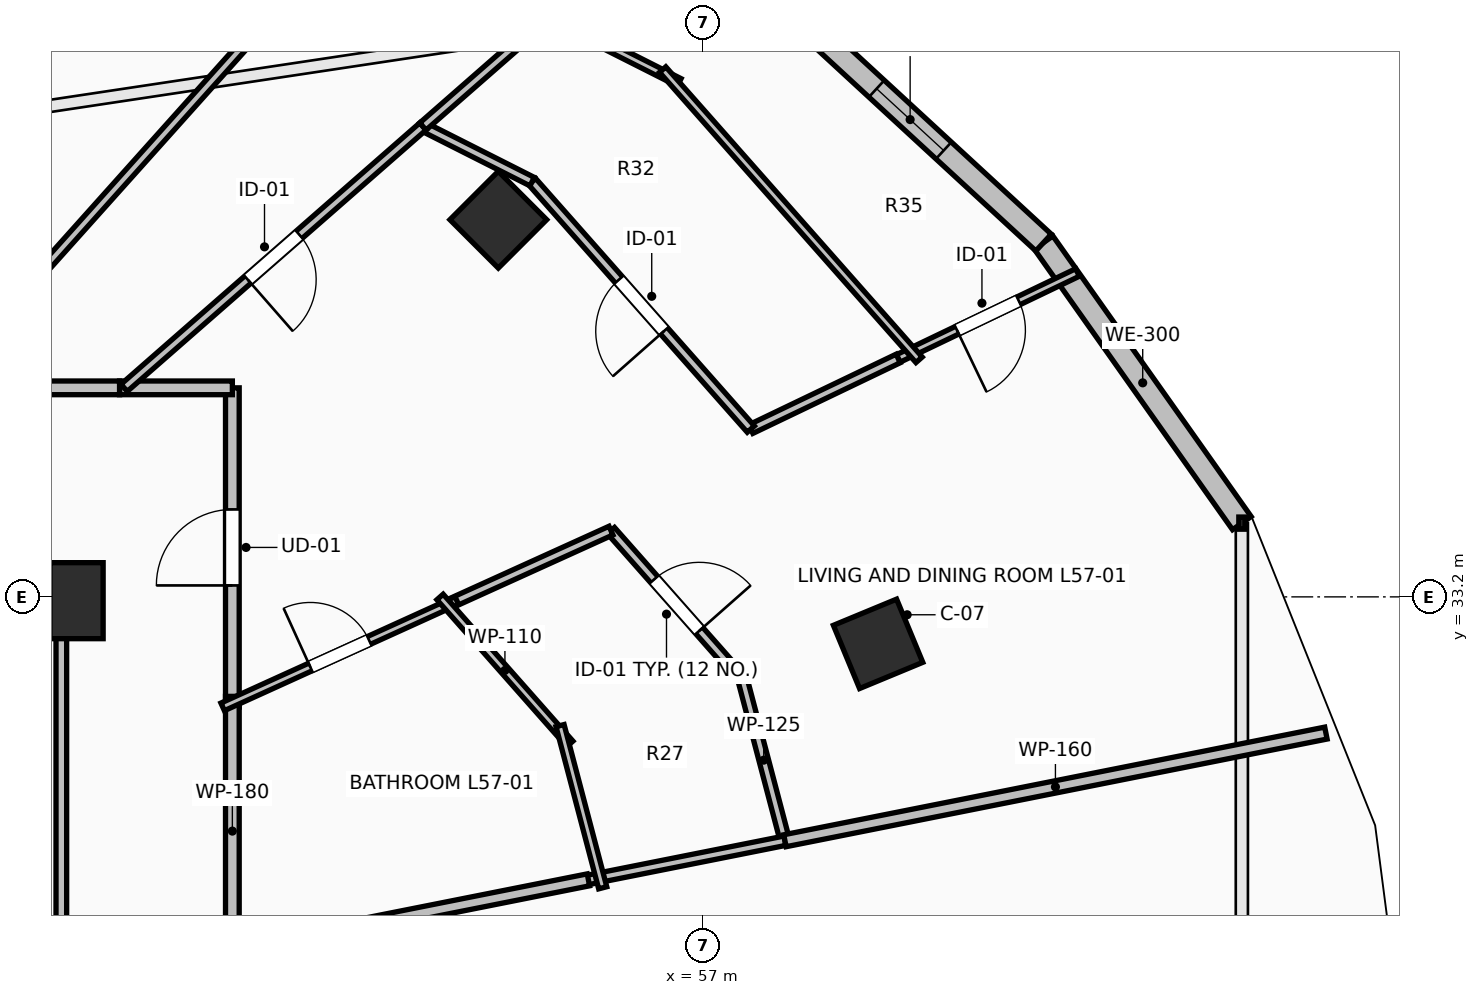
"""IFC4 building model, lengths in metres.
Left out: names, types, materials, properties, quantities, classifications, styles, units other than length and angle.
Written with IfcOpenShell. Run it as: python <this file> out.ifc"""

import sys

from ifc_helpers import new_model, si_unit, direction, frame, frame_2d, origin, origin_2d, place, context, subcontext, project, spatial, rectangle, extrude, element, fill, save


model = new_model("IFC4")
c1 = context("Model", 3, precision=1e-05, world=origin(), true_north=direction((0.0, 1.0)))
c2 = subcontext(c1, "Body", "Model", "MODEL_VIEW")
j1 = project(units=[si_unit("LENGTHUNIT", "METRE"), si_unit("PLANEANGLEUNIT", "RADIAN")], contexts=[c1])
p1 = place(None, origin())
s1 = spatial("IfcSite", under=j1, at=p1, CompositionType="ELEMENT")
p2 = place(p1, origin())
s2 = spatial("IfcBuilding", under=s1, at=p2, CompositionType="ELEMENT")
p3 = place(p2, frame((0.0, 0.0, 210.75)))
s3 = spatial("IfcBuildingStorey", under=s2, at=p3, CompositionType="ELEMENT", Elevation=210.75)
for number, where, z_axis, x_axis in (
    (1, (59.295, 32.582, 0.0), (0.0, 0.0, 1.0), (0.924, 0.383, 0.0)),
    (2, (54.299, 38.162, 0.0), (0.0, 0.0, 1.0), (0.707, 0.707, 0.0)),
):
    element("IfcColumn", number, at=place(p3, frame(where, z_axis=z_axis, x_axis=x_axis)), inside=s3, PredefinedType="COLUMN", context=c2, shape_type="SweptSolid", body=[
        extrude(rectangle(XDim=0.9, YDim=0.9, at=origin_2d()), origin(), (0.0, 0.0, 1.0), 3.55),
    ])
p4 = place(p3, frame((48.75, 33.15, 0.0), z_axis=(0.0, 0.0, 1.0), x_axis=(1.0, 0.0, 0.0)))
e3 = element("IfcColumn", 3, at=p4, inside=s3, PredefinedType="PILASTER", context=c2, shape_type="SweptSolid", body=[
    extrude(rectangle(XDim=0.7, YDim=1.0, at=origin_2d()), origin(), (0.0, 0.0, 1.0), 3.55),
])
p5 = place(p3, frame((64.081, 34.17, 0.0), z_axis=(0.0, 0.0, 1.0), x_axis=(-0.577168747264, 0.81662490605, 0.0)))
e4 = element("IfcWall", 4, at=p5, inside=s3, PredefinedType="STANDARD", context=c2, shape_type="SweptSolid", body=[
    extrude(rectangle(XDim=4.52, YDim=0.3, at=frame_2d((2.26, 0.0))), origin(), (0.0, 0.0, 1.0), 3.29),
])
p6 = place(p3, frame((61.472, 37.861, 0.0), z_axis=(0.0, 0.0, 1.0), x_axis=(-0.735359993374, 0.677676678177, 0.0)))
e5 = element("IfcWall", 5, at=p6, inside=s3, PredefinedType="STANDARD", context=c2, shape_type="SweptSolid", body=[
    extrude(rectangle(XDim=4.774, YDim=0.3, at=frame_2d((2.387, 0.0))), origin(), (0.0, 0.0, 1.0), 3.29),
])
p7 = place(p6, frame((1.787, 0.0, 0.85)))
e6 = element("IfcOpeningElement", 6, at=p7, cuts=e5, PredefinedType="OPENING", context=c2, shape_type="SweptSolid", body=[
    extrude(rectangle(XDim=1.2, YDim=2.1, at=frame_2d((0.6, 1.05))), frame((0.0, 0.165, 0.0), z_axis=(0.0, -1.0, 0.0), x_axis=(1.0, 0.0, 0.0)), (0.0, 0.0, 1.0), 0.33),
])
p8 = place(p3, frame((50.8, 31.751, 0.0), z_axis=(0.0, 0.0, 1.0), x_axis=(0.0, 1.0, 0.0)))
e7 = element("IfcWall", 7, at=p8, inside=s3, PredefinedType="PARTITIONING", context=c2, shape_type="SweptSolid", body=[
    extrude(rectangle(XDim=4.199, YDim=0.18, at=frame_2d((2.1, 0.0))), origin(), (0.0, 0.0, 1.0), 2.482),
])
p9 = place(p8, frame((1.6, 0.0, 0.0)))
e8 = element("IfcOpeningElement", 8, at=p9, cuts=e7, PredefinedType="OPENING", context=c2, shape_type="SweptSolid", body=[
    extrude(rectangle(XDim=1.0, YDim=2.15, at=frame_2d((0.5, 1.075))), frame((0.0, 0.105, 0.0), z_axis=(0.0, -1.0, 0.0), x_axis=(1.0, 0.0, 0.0)), (0.0, 0.0, 1.0), 0.21),
])
p10 = place(p3, frame((50.8, 35.95, 0.0), z_axis=(0.0, 0.0, 1.0), x_axis=(-1.0, 0.0, 0.0)))
e9 = element("IfcWall", 9, at=p10, inside=s3, PredefinedType="PARTITIONING", context=c2, shape_type="SweptSolid", body=[
    extrude(rectangle(XDim=1.484, YDim=0.18, at=frame_2d((0.742, 0.0))), origin(), (0.0, 0.0, 1.0), 3.29),
])
p11 = place(p3, frame((50.8, 28.346, 0.0), z_axis=(0.0, 0.0, 1.0), x_axis=(0.0, 1.0, 0.0)))
e10 = element("IfcWall", 10, at=p11, inside=s3, PredefinedType="PARTITIONING", context=c2, shape_type="SweptSolid", body=[
    extrude(rectangle(XDim=3.545, YDim=0.18, at=frame_2d((1.772, 0.0))), origin(), (0.0, 0.0, 1.0), 3.29),
])
p12 = place(p3, frame((49.316, 35.95, 0.0), z_axis=(0.0, 0.0, 1.0), x_axis=(-1.0, 0.0, 0.0)))
e11 = element("IfcWall", 11, at=p12, inside=s3, PredefinedType="PARTITIONING", context=c2, shape_type="SweptSolid", body=[
    extrude(rectangle(XDim=2.464, YDim=0.18, at=frame_2d((1.232, 0.0))), origin(), (0.0, 0.0, 1.0), 2.482),
])
p13 = place(p3, frame((55.781, 34.072, 0.0), z_axis=(0.0, 0.0, 1.0), x_axis=(0.661961245166, -0.749538064343, 0.0)))
e12 = element("IfcWall", 12, at=p13, inside=s3, PredefinedType="PARTITIONING", context=c2, shape_type="SweptSolid", body=[
    extrude(rectangle(XDim=2.615, YDim=0.125, at=frame_2d((1.308, 0.0))), origin(), (0.0, 0.0, 1.0), 2.482),
])
p14 = place(p13, frame((0.857, 0.0, 0.0)))
e13 = element("IfcOpeningElement", 13, at=p14, cuts=e12, PredefinedType="OPENING", context=c2, shape_type="SweptSolid", body=[
    extrude(rectangle(XDim=0.9, YDim=2.1, at=frame_2d((0.45, 1.05))), frame((0.0, 0.077, 0.0), z_axis=(0.0, -1.0, 0.0), x_axis=(1.0, 0.0, 0.0)), (0.0, 0.0, 1.0), 0.155),
])
p15 = place(p3, frame((57.512, 32.112, 0.0), z_axis=(0.0, 0.0, 1.0), x_axis=(0.254570039115, -0.967054339314, 0.0)))
e14 = element("IfcWall", 14, at=p15, inside=s3, PredefinedType="PARTITIONING", context=c2, shape_type="SweptSolid", body=[
    extrude(rectangle(XDim=2.192, YDim=0.125, at=frame_2d((1.096, 0.0))), origin(), (0.0, 0.0, 1.0), 3.29),
])
p16 = place(p3, frame((58.07, 29.992, 0.0), z_axis=(0.0, 0.0, 1.0), x_axis=(-0.98076287284, -0.19520293865, 0.0)))
e15 = element("IfcWall", 15, at=p16, inside=s3, PredefinedType="PARTITIONING", context=c2, shape_type="SweptSolid", body=[
    extrude(rectangle(XDim=2.777, YDim=0.125, at=frame_2d((1.388, 0.0))), origin(), (0.0, 0.0, 1.0), 2.936),
])
p17 = place(p3, frame((53.625, 33.094, 0.0), z_axis=(0.0, 0.0, 1.0), x_axis=(0.910680528551, 0.413111334773, 0.0)))
e16 = element("IfcWall", 16, at=p17, inside=s3, PredefinedType="PARTITIONING", context=c2, shape_type="SweptSolid", body=[
    extrude(rectangle(XDim=2.367, YDim=0.125, at=frame_2d((1.184, 0.0))), origin(), (0.0, 0.0, 1.0), 2.482),
])
p18 = place(p3, frame((50.673, 31.753, 0.0), z_axis=(0.0, 0.0, 1.0), x_axis=(0.910504846956, 0.413498396212, 0.0)))
e17 = element("IfcWall", 17, at=p18, inside=s3, PredefinedType="PARTITIONING", context=c2, shape_type="SweptSolid", body=[
    extrude(rectangle(XDim=3.383, YDim=0.11, at=frame_2d((1.691, 0.0))), origin(), (0.0, 0.0, 1.0), 2.482),
])
p19 = place(p18, frame((1.266, 0.0, 0.0)))
e18 = element("IfcOpeningElement", 18, at=p19, cuts=e17, PredefinedType="OPENING", context=c2, shape_type="SweptSolid", body=[
    extrude(rectangle(XDim=0.85, YDim=2.1, at=frame_2d((0.425, 1.05))), frame((0.0, 0.07, 0.0), z_axis=(0.0, -1.0, 0.0), x_axis=(1.0, 0.0, 0.0)), (0.0, 0.0, 1.0), 0.14),
])
p20 = place(p3, frame((61.919, 37.468, 0.0), z_axis=(0.0, 0.0, 1.0), x_axis=(-0.901731167672, -0.432297237151, 0.0)))
e19 = element("IfcWall", 19, at=p20, inside=s3, PredefinedType="PARTITIONING", context=c2, shape_type="SweptSolid", body=[
    extrude(rectangle(XDim=2.616, YDim=0.11, at=frame_2d((1.308, 0.0))), origin(), (0.0, 0.0, 1.0), 3.29),
])
p21 = place(p20, frame((0.858, 0.0, 0.0)))
e20 = element("IfcOpeningElement", 20, at=p21, cuts=e19, PredefinedType="OPENING", context=c2, shape_type="SweptSolid", body=[
    extrude(rectangle(XDim=0.9, YDim=2.1, at=frame_2d((0.45, 1.05))), frame((0.0, 0.07, 0.0), z_axis=(0.0, -1.0, 0.0), x_axis=(1.0, 0.0, 0.0)), (0.0, 0.0, 1.0), 0.14),
])
p22 = place(p3, frame((59.56, 36.336, 0.0), z_axis=(0.0, 0.0, 1.0), x_axis=(-0.901730274491, -0.432299100238, 0.0)))
e21 = element("IfcWall", 21, at=p22, inside=s3, PredefinedType="PARTITIONING", context=c2, shape_type="SweptSolid", body=[
    extrude(rectangle(XDim=2.15, YDim=0.125, at=frame_2d((1.075, 0.0))), origin(), (0.0, 0.0, 1.0), 3.29),
])
p23 = place(p3, frame((57.621, 35.407, 0.0), z_axis=(0.0, 0.0, 1.0), x_axis=(-0.662160377652, 0.749362151612, 0.0)))
e22 = element("IfcWall", 22, at=p23, inside=s3, PredefinedType="PARTITIONING", context=c2, shape_type="SweptSolid", body=[
    extrude(rectangle(XDim=4.345, YDim=0.125, at=frame_2d((2.173, 0.0))), origin(), (0.0, 0.0, 1.0), 3.29),
])
p24 = place(p23, frame((1.722, 0.0, 0.0)))
e23 = element("IfcOpeningElement", 23, at=p24, cuts=e22, PredefinedType="OPENING", context=c2, shape_type="SweptSolid", body=[
    extrude(rectangle(XDim=0.9, YDim=2.1, at=frame_2d((0.45, 1.05))), frame((0.0, 0.077, 0.0), z_axis=(0.0, -1.0, 0.0), x_axis=(1.0, 0.0, 0.0)), (0.0, 0.0, 1.0), 0.155),
])
p25 = place(p3, frame((54.744, 38.663, 0.0), z_axis=(0.0, 0.0, 1.0), x_axis=(-0.892600010283, 0.450849444541, 0.0)))
e24 = element("IfcWall", 24, at=p25, inside=s3, PredefinedType="PARTITIONING", context=c2, shape_type="SweptSolid", body=[
    extrude(rectangle(XDim=1.61, YDim=0.125, at=frame_2d((0.805, 0.0))), origin(), (0.0, 0.0, 1.0), 3.29),
])
p26 = place(p3, frame((53.307, 39.389, 0.0), z_axis=(0.0, 0.0, 1.0), x_axis=(-0.752631709834, -0.658441728137, 0.0)))
e25 = element("IfcWall", 25, at=p26, inside=s3, PredefinedType="PARTITIONING", context=c2, shape_type="SweptSolid", body=[
    extrude(rectangle(XDim=5.223, YDim=0.125, at=frame_2d((2.611, 0.0))), origin(), (0.0, 0.0, 1.0), 2.824),
])
p27 = place(p26, frame((2.162, 0.0, 0.0)))
e26 = element("IfcOpeningElement", 26, at=p27, cuts=e25, PredefinedType="OPENING", context=c2, shape_type="SweptSolid", body=[
    extrude(rectangle(XDim=0.9, YDim=2.1, at=frame_2d((0.45, 1.05))), frame((0.0, 0.077, 0.0), z_axis=(0.0, -1.0, 0.0), x_axis=(1.0, 0.0, 0.0)), (0.0, 0.0, 1.0), 0.155),
])
p28 = place(p3, frame((58.07, 29.992, 0.0), z_axis=(0.0, 0.0, 1.0), x_axis=(0.980769147175, 0.19517141171, 0.0)))
e27 = element("IfcWall", 27, at=p28, inside=s3, PredefinedType="PARTITIONING", context=c2, shape_type="SweptSolid", body=[
    extrude(rectangle(XDim=7.257, YDim=0.16, at=frame_2d((3.628, 0.0))), origin(), (0.0, 0.0, 1.0), 2.824),
])
p29 = place(p3, frame((53.532, 33.199, 0.0), z_axis=(0.0, 0.0, 1.0), x_axis=(0.662069232061, -0.749442680902, 0.0)))
e28 = element("IfcWall", 28, at=p29, inside=s3, PredefinedType="PARTITIONING", context=c2, shape_type="SweptSolid", body=[
    extrude(rectangle(XDim=2.579, YDim=0.11, at=frame_2d((1.29, 0.0))), origin(), (0.0, 0.0, 1.0), 2.482),
])
p30 = place(p3, frame((55.111, 31.506, 0.0), z_axis=(0.0, 0.0, 1.0), x_axis=(0.254389812051, -0.967101764823, 0.0)))
e29 = element("IfcWall", 29, at=p30, inside=s3, PredefinedType="PARTITIONING", context=c2, shape_type="SweptSolid", body=[
    extrude(rectangle(XDim=2.206, YDim=0.11, at=frame_2d((1.103, 0.0))), origin(), (0.0, 0.0, 1.0), 3.29),
])
p31 = place(p3, frame((50.663, 28.519, 0.0), z_axis=(0.0, 0.0, 1.0), x_axis=(0.980809211653, 0.194969972909, 0.0)))
e30 = element("IfcWall", 30, at=p31, inside=s3, PredefinedType="PARTITIONING", context=c2, shape_type="SweptSolid", body=[
    extrude(rectangle(XDim=4.916, YDim=0.16, at=frame_2d((2.458, 0.0))), origin(), (0.0, 0.0, 1.0), 2.979),
])
p32 = place(p3, frame((54.837, 40.899, 0.0), z_axis=(0.0, 0.0, 1.0), x_axis=(0.892645505641, -0.450759360701, 0.0)))
e31 = element("IfcWall", 31, at=p32, inside=s3, PredefinedType="PARTITIONING", context=c2, shape_type="SweptSolid", body=[
    extrude(rectangle(XDim=2.063, YDim=0.11, at=frame_2d((1.032, 0.0))), origin(), (0.0, 0.0, 1.0), 3.29),
])
p33 = place(p3, frame((56.461, 40.137, 0.0), z_axis=(0.0, 0.0, 1.0), x_axis=(0.662153993881, -0.749367792467, 0.0)))
e32 = element("IfcWall", 32, at=p33, inside=s3, PredefinedType="PARTITIONING", context=c2, shape_type="SweptSolid", body=[
    extrude(rectangle(XDim=5.095, YDim=0.11, at=frame_2d((2.547, 0.0))), origin(), (0.0, 0.0, 1.0), 3.29),
])
p34 = place(p3, frame((54.856, 40.744, 0.0), z_axis=(0.0, 0.0, 1.0), x_axis=(-0.752679548168, -0.658387042528, 0.0)))
e33 = element("IfcWall", 33, at=p34, inside=s3, PredefinedType="PARTITIONING", context=c2, shape_type="SweptSolid", body=[
    extrude(rectangle(XDim=2.058, YDim=0.125, at=frame_2d((1.029, 0.0))), origin(), (0.0, 0.0, 1.0), 3.29),
])
p35 = place(p3, frame((53.822, 43.665, 0.0), z_axis=(0.0, 0.0, 1.0), x_axis=(-0.667166856079, -0.74490830721, 0.0)))
e34 = element("IfcWall", 34, at=p35, inside=s3, PredefinedType="PARTITIONING", context=c2, shape_type="SweptSolid", body=[
    extrude(rectangle(XDim=10.357, YDim=0.125, at=frame_2d((5.179, 0.0))), origin(), (0.0, 0.0, 1.0), 2.482),
])
p36 = place(p3, frame((51.099, 44.795, 0.0), z_axis=(0.0, 0.0, 1.0), x_axis=(-0.571754326018, -0.82042488424, 0.0)))
e35 = element("IfcWall", 35, at=p36, inside=s3, PredefinedType="PARTITIONING", context=c2, shape_type="SweptSolid", body=[
    extrude(rectangle(XDim=10.781, YDim=0.125, at=frame_2d((5.391, 0.0))), origin(), (0.0, 0.0, 1.0), 2.482),
])
p37 = place(p3, frame((48.482, 45.797, 0.0), z_axis=(0.0, 0.0, 1.0), x_axis=(-0.46793402924, -0.883763398359, 0.0)))
e36 = element("IfcWall", 36, at=p37, inside=s3, PredefinedType="PARTITIONING", context=c2, shape_type="SweptSolid", body=[
    extrude(rectangle(XDim=11.142, YDim=0.125, at=frame_2d((5.571, 0.0))), origin(), (0.0, 0.0, 1.0), 2.824),
])
p38 = place(p3, frame((48.55, 28.196, 0.0), z_axis=(0.0, 0.0, 1.0), x_axis=(0.0, 1.0, 0.0)))
e37 = element("IfcWall", 37, at=p38, inside=s3, PredefinedType="PARTITIONING", context=c2, shape_type="SweptSolid", body=[
    extrude(rectangle(XDim=5.254, YDim=0.14, at=frame_2d((2.627, 0.0))), origin(), (0.0, 0.0, 1.0), 2.482),
])
p39 = place(p3, frame((48.55, 33.45, 0.0), z_axis=(0.0, 0.0, 1.0), x_axis=(-1.0, 0.0, 0.0)))
e38 = element("IfcWall", 38, at=p39, inside=s3, PredefinedType="PARTITIONING", context=c2, shape_type="SweptSolid", body=[
    extrude(rectangle(XDim=4.21, YDim=0.14, at=frame_2d((2.105, 0.0))), origin(), (0.0, 0.0, 1.0), 2.482),
])
p40 = place(p7, origin())
e39 = element("IfcWindow", 39, at=p40, inside=s3, PartitioningType="SINGLE_PANEL", PredefinedType="WINDOW", context=c2, shape_type="SweptSolid", body=[
    extrude(rectangle(XDim=1.2, YDim=2.1, at=frame_2d((0.6, 1.05))), frame((0.0, 0.03, 0.0), z_axis=(0.0, -1.0, 0.0), x_axis=(1.0, 0.0, 0.0)), (0.0, 0.0, 1.0), 0.06),
])
fill(e6, e39)
p41 = place(p9, origin())
e40 = element("IfcDoor", 40, at=p41, inside=s3, OperationType="SINGLE_SWING_LEFT", PredefinedType="DOOR", context=c2, shape_type="SweptSolid", body=[
    extrude(rectangle(XDim=1.0, YDim=2.15, at=frame_2d((0.5, 1.075))), frame((0.0, 0.025, 0.0), z_axis=(0.0, -1.0, 0.0), x_axis=(1.0, 0.0, 0.0)), (0.0, 0.0, 1.0), 0.05),
])
fill(e8, e40)
p42 = place(p14, origin())
e41 = element("IfcDoor", 41, at=p42, inside=s3, OperationType="SINGLE_SWING_RIGHT", PredefinedType="DOOR", context=c2, shape_type="SweptSolid", body=[
    extrude(rectangle(XDim=0.9, YDim=2.1, at=frame_2d((0.45, 1.05))), frame((0.0, 0.025, 0.0), z_axis=(0.0, -1.0, 0.0), x_axis=(1.0, 0.0, 0.0)), (0.0, 0.0, 1.0), 0.05),
])
fill(e13, e41)
p43 = place(p19, origin())
e42 = element("IfcDoor", 42, at=p43, inside=s3, OperationType="SINGLE_SWING_LEFT", PredefinedType="DOOR", context=c2, shape_type="SweptSolid", body=[
    extrude(rectangle(XDim=0.85, YDim=2.1, at=frame_2d((0.425, 1.05))), frame((0.0, 0.025, 0.0), z_axis=(0.0, -1.0, 0.0), x_axis=(1.0, 0.0, 0.0)), (0.0, 0.0, 1.0), 0.05),
])
fill(e18, e42)
p44 = place(p21, origin())
e43 = element("IfcDoor", 43, at=p44, inside=s3, OperationType="SINGLE_SWING_RIGHT", PredefinedType="DOOR", context=c2, shape_type="SweptSolid", body=[
    extrude(rectangle(XDim=0.9, YDim=2.1, at=frame_2d((0.45, 1.05))), frame((0.0, 0.025, 0.0), z_axis=(0.0, -1.0, 0.0), x_axis=(1.0, 0.0, 0.0)), (0.0, 0.0, 1.0), 0.05),
])
fill(e20, e43)
p45 = place(p24, origin())
e44 = element("IfcDoor", 44, at=p45, inside=s3, OperationType="SINGLE_SWING_LEFT", PredefinedType="DOOR", context=c2, shape_type="SweptSolid", body=[
    extrude(rectangle(XDim=0.9, YDim=2.1, at=frame_2d((0.45, 1.05))), frame((0.0, 0.025, 0.0), z_axis=(0.0, -1.0, 0.0), x_axis=(1.0, 0.0, 0.0)), (0.0, 0.0, 1.0), 0.05),
])
fill(e23, e44)
p46 = place(p27, origin())
e45 = element("IfcDoor", 45, at=p46, inside=s3, OperationType="SINGLE_SWING_RIGHT", PredefinedType="DOOR", context=c2, shape_type="SweptSolid", body=[
    extrude(rectangle(XDim=0.9, YDim=2.1, at=frame_2d((0.45, 1.05))), frame((0.0, 0.025, 0.0), z_axis=(0.0, -1.0, 0.0), x_axis=(1.0, 0.0, 0.0)), (0.0, 0.0, 1.0), 0.05),
])
fill(e26, e45)
save(model, sys.argv[1])
